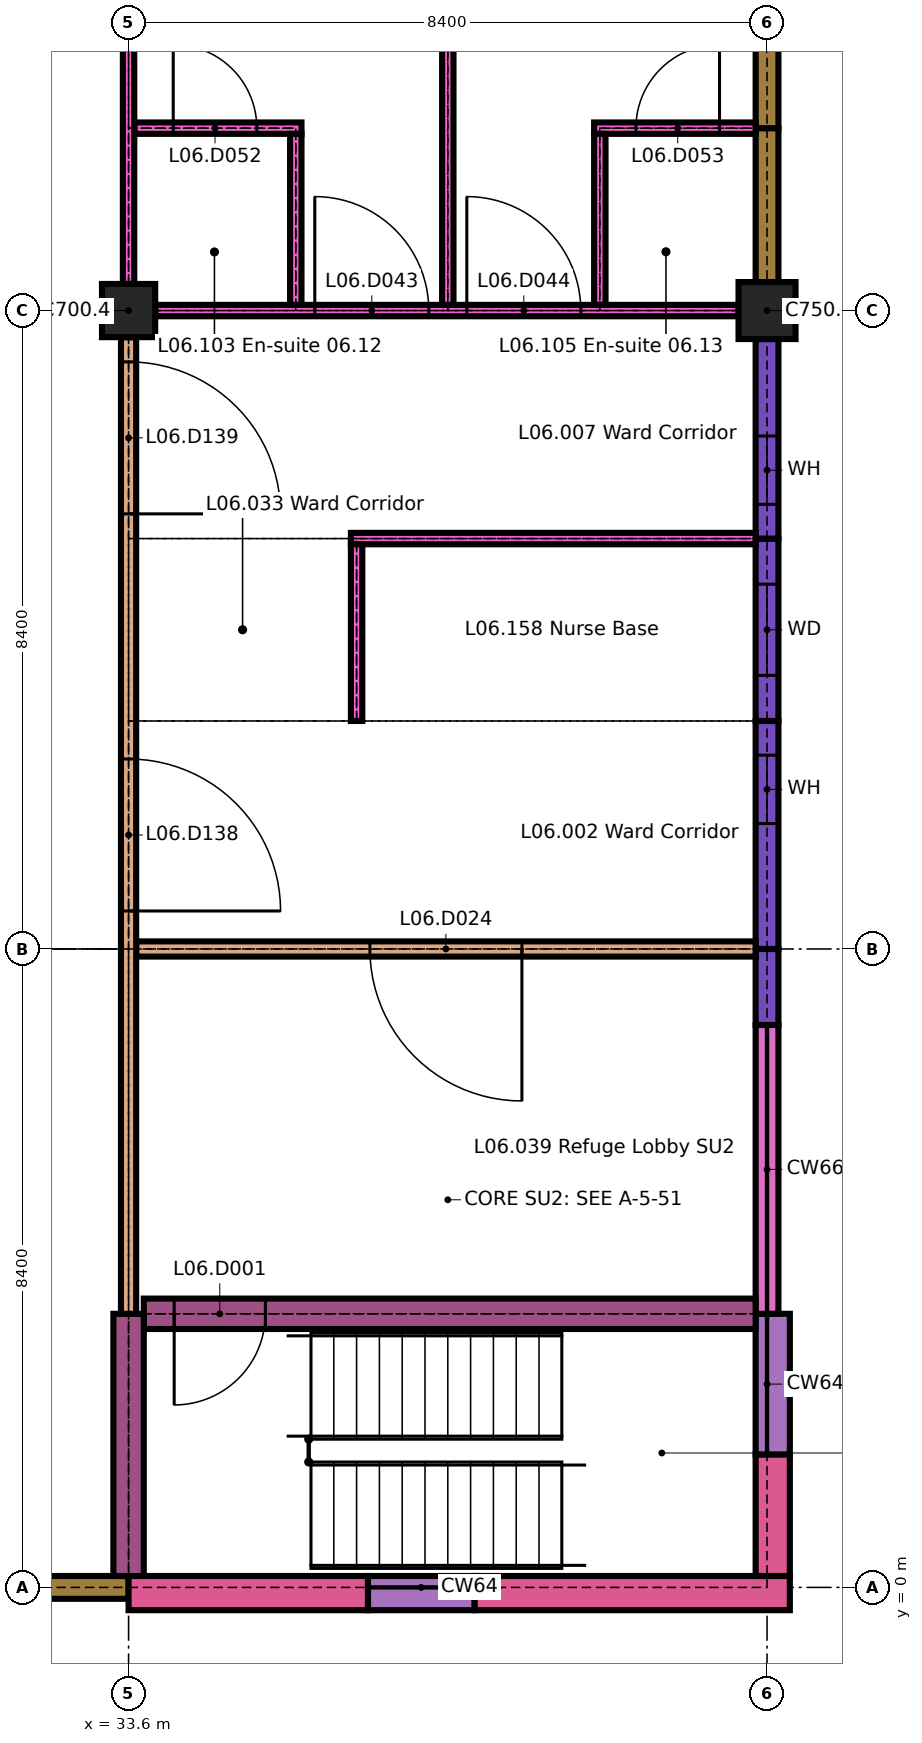
"""IFC4 building model, lengths in metres.
Left out: names, types, materials, properties, quantities, classifications, styles, units other than length and angle.
Written with IfcOpenShell. Run it as: python <this file> out.ifc"""

import sys

from ifc_helpers import new_model, si_unit, direction, frame, frame_2d, origin, origin_2d, place, context, subcontext, project, spatial, rectangle, extrude, element, fill, save


model = new_model("IFC4")
c1 = context("Model", 3, precision=1e-05, world=origin(), true_north=direction((0.0, 1.0)))
c2 = subcontext(c1, "Body", "Model", "MODEL_VIEW")
j1 = project(units=[si_unit("LENGTHUNIT", "METRE"), si_unit("PLANEANGLEUNIT", "RADIAN")], contexts=[c1])
p1 = place(None, origin())
s1 = spatial("IfcSite", under=j1, at=p1, CompositionType="ELEMENT")
p2 = place(p1, origin())
s2 = spatial("IfcBuilding", under=s1, at=p2, CompositionType="ELEMENT")
p3 = place(p2, frame((0.0, 0.0, 26.1)))
s3 = spatial("IfcBuildingStorey", under=s2, at=p3, CompositionType="ELEMENT", Elevation=26.1)
p4 = place(p3, frame((33.6, 16.8, 0.0), z_axis=(0.0, 0.0, 1.0), x_axis=(1.0, 0.0, 0.0)))
e1 = element("IfcColumn", 1, at=p4, inside=s3, PredefinedType="COLUMN", context=c2, shape_type="SweptSolid", body=[
    extrude(rectangle(XDim=0.7, YDim=0.7, at=origin_2d()), origin(), (0.0, 0.0, 1.0), 3.3),
])
p5 = place(p3, frame((42.0, 16.8, 0.0), z_axis=(0.0, 0.0, 1.0), x_axis=(1.0, 0.0, 0.0)))
e2 = element("IfcColumn", 2, at=p5, inside=s3, PredefinedType="COLUMN", context=c2, shape_type="SweptSolid", body=[
    extrude(rectangle(XDim=0.75, YDim=0.75, at=origin_2d()), origin(), (0.0, 0.0, 1.0), 3.2),
])
p6 = place(p3, frame((32.3, 0.0, 0.0), z_axis=(0.0, 0.0, 1.0), x_axis=(1.0, 0.0, 0.0)))
e3 = element("IfcWall", 3, at=p6, inside=s3, PredefinedType="SOLIDWALL", context=c2, shape_type="SweptSolid", body=[
    extrude(rectangle(XDim=1.3, YDim=0.3, at=frame_2d((0.65, 0.0))), origin(), (0.0, 0.0, 1.0), 2.9),
])
p7 = place(p3, frame((33.6, -0.075, 0.0), z_axis=(0.0, 0.0, 1.0), x_axis=(1.0, 0.0, 0.0)))
e4 = element("IfcWall", 4, at=p7, inside=s3, PredefinedType="SOLIDWALL", context=c2, shape_type="SweptSolid", body=[
    extrude(rectangle(XDim=3.15, YDim=0.45, at=frame_2d((1.575, 0.0))), origin(), (0.0, 0.0, 1.0), 3.3),
])
p8 = place(p3, frame((38.15, -0.075, 0.0), z_axis=(0.0, 0.0, 1.0), x_axis=(1.0, 0.0, 0.0)))
e5 = element("IfcWall", 5, at=p8, inside=s3, PredefinedType="SOLIDWALL", context=c2, shape_type="SweptSolid", body=[
    extrude(rectangle(XDim=4.15, YDim=0.45, at=frame_2d((2.075, 0.0))), origin(), (0.0, 0.0, 1.0), 3.3),
])
p9 = place(p3, frame((36.75, -0.075, 0.0), z_axis=(0.0, 0.0, 1.0), x_axis=(1.0, 0.0, 0.0)))
e6 = element("IfcWall", 6, at=p9, inside=s3, PredefinedType="SOLIDWALL", context=c2, shape_type="SweptSolid", body=[
    extrude(rectangle(XDim=1.4, YDim=0.45, at=frame_2d((0.7, 0.0))), origin(), (0.0, 0.0, 1.0), 0.6),
])
p10 = place(p3, frame((42.075, 0.15, 0.0), z_axis=(0.0, 0.0, 1.0), x_axis=(0.0, 1.0, 0.0)))
e7 = element("IfcWall", 7, at=p10, inside=s3, PredefinedType="SOLIDWALL", context=c2, shape_type="SweptSolid", body=[
    extrude(rectangle(XDim=1.6, YDim=0.45, at=frame_2d((0.8, 0.0))), origin(), (0.0, 0.0, 1.0), 3.3),
])
p11 = place(p3, frame((42.075, 1.75, 0.0), z_axis=(0.0, 0.0, 1.0), x_axis=(0.0, 1.0, 0.0)))
e8 = element("IfcWall", 8, at=p11, inside=s3, PredefinedType="SOLIDWALL", context=c2, shape_type="SweptSolid", body=[
    extrude(rectangle(XDim=1.85, YDim=0.45, at=frame_2d((0.925, 0.0))), origin(), (0.0, 0.0, 1.0), 0.6),
])
p12 = place(p3, frame((42.0, 7.4, 0.0), z_axis=(0.0, 0.0, 1.0), x_axis=(0.0, 1.0, 0.0)))
e9 = element("IfcWall", 9, at=p12, inside=s3, PredefinedType="SOLIDWALL", context=c2, shape_type="SweptSolid", body=[
    extrude(rectangle(XDim=1.0, YDim=0.3, at=frame_2d((0.5, 0.0))), origin(), (0.0, 0.0, 1.0), 3.3),
])
p13 = place(p3, frame((42.0, 3.6, 0.0), z_axis=(0.0, 0.0, 1.0), x_axis=(0.0, 1.0, 0.0)))
e10 = element("IfcWall", 10, at=p13, inside=s3, PredefinedType="SOLIDWALL", context=c2, shape_type="SweptSolid", body=[
    extrude(rectangle(XDim=3.8, YDim=0.3, at=frame_2d((1.9, 0.0))), origin(), (0.0, 0.0, 1.0), 0.6),
])
p14 = place(p3, frame((42.0, 8.4, 0.0), z_axis=(0.0, 0.0, 1.0), x_axis=(0.0, 1.0, 0.0)))
e11 = element("IfcWall", 11, at=p14, inside=s3, PredefinedType="SOLIDWALL", context=c2, shape_type="SweptSolid", body=[
    extrude(rectangle(XDim=3.0, YDim=0.3, at=frame_2d((1.5, 0.0))), origin(), (0.0, 0.0, 1.0), 3.3),
])
p15 = place(p14, frame((1.65, 0.0, 0.9)))
e12 = element("IfcOpeningElement", 12, at=p15, cuts=e11, PredefinedType="OPENING", context=c2, shape_type="SweptSolid", body=[
    extrude(rectangle(XDim=0.9, YDim=1.5, at=frame_2d((0.45, 0.75))), frame((0.0, 0.16, 0.0), z_axis=(0.0, -1.0, 0.0), x_axis=(1.0, 0.0, 0.0)), (0.0, 0.0, 1.0), 0.32),
])
p16 = place(p3, frame((42.0, 11.4, 0.0), z_axis=(0.0, 0.0, 1.0), x_axis=(0.0, 1.0, 0.0)))
e13 = element("IfcWall", 13, at=p16, inside=s3, PredefinedType="SOLIDWALL", context=c2, shape_type="SweptSolid", body=[
    extrude(rectangle(XDim=2.4, YDim=0.3, at=frame_2d((1.2, 0.0))), origin(), (0.0, 0.0, 1.0), 3.3),
])
p17 = place(p16, frame((0.6, 0.0, 0.9)))
e14 = element("IfcOpeningElement", 14, at=p17, cuts=e13, PredefinedType="OPENING", context=c2, shape_type="SweptSolid", body=[
    extrude(rectangle(XDim=1.2, YDim=1.5, at=frame_2d((0.6, 0.75))), frame((0.0, 0.16, 0.0), z_axis=(0.0, -1.0, 0.0), x_axis=(1.0, 0.0, 0.0)), (0.0, 0.0, 1.0), 0.32),
])
p18 = place(p3, frame((42.0, 13.8, 0.0), z_axis=(0.0, 0.0, 1.0), x_axis=(0.0, 1.0, 0.0)))
e15 = element("IfcWall", 15, at=p18, inside=s3, PredefinedType="SOLIDWALL", context=c2, shape_type="SweptSolid", body=[
    extrude(rectangle(XDim=2.625, YDim=0.3, at=frame_2d((1.312, 0.0))), origin(), (0.0, 0.0, 1.0), 3.3),
])
p19 = place(p18, frame((0.45, 0.0, 0.9)))
e16 = element("IfcOpeningElement", 16, at=p19, cuts=e15, PredefinedType="OPENING", context=c2, shape_type="SweptSolid", body=[
    extrude(rectangle(XDim=0.9, YDim=1.5, at=frame_2d((0.45, 0.75))), frame((0.0, 0.16, 0.0), z_axis=(0.0, -1.0, 0.0), x_axis=(1.0, 0.0, 0.0)), (0.0, 0.0, 1.0), 0.32),
])
p20 = place(p3, frame((42.0, 17.175, 0.0), z_axis=(0.0, 0.0, 1.0), x_axis=(0.0, 1.0, 0.0)))
e17 = element("IfcWall", 17, at=p20, inside=s3, PredefinedType="SOLIDWALL", context=c2, shape_type="SweptSolid", body=[
    extrude(rectangle(XDim=2.025, YDim=0.3, at=frame_2d((1.012, 0.0))), origin(), (0.0, 0.0, 1.0), 2.9),
])
p21 = place(p3, frame((42.0, 19.2, 0.0), z_axis=(0.0, 0.0, 1.0), x_axis=(0.0, 1.0, 0.0)))
e18 = element("IfcWall", 18, at=p21, inside=s3, PredefinedType="SOLIDWALL", context=c2, shape_type="SweptSolid", body=[
    extrude(rectangle(XDim=5.625, YDim=0.3, at=frame_2d((2.812, 0.0))), origin(), (0.0, 0.0, 1.0), 2.9),
])
p22 = place(p21, frame((2.85, 0.0, 0.9)))
e19 = element("IfcOpeningElement", 19, at=p22, cuts=e18, PredefinedType="OPENING", context=c2, shape_type="SweptSolid", body=[
    extrude(rectangle(XDim=2.1, YDim=1.5, at=frame_2d((1.05, 0.75))), frame((0.0, 0.16, 0.0), z_axis=(0.0, -1.0, 0.0), x_axis=(1.0, 0.0, 0.0)), (0.0, 0.0, 1.0), 0.32),
])
p23 = place(p3, frame((33.8, 3.6, 0.0), z_axis=(0.0, 0.0, 1.0), x_axis=(1.0, 0.0, 0.0)))
e20 = element("IfcWall", 20, at=p23, inside=s3, PredefinedType="SHEAR", context=c2, shape_type="SweptSolid", body=[
    extrude(rectangle(XDim=8.05, YDim=0.4, at=frame_2d((4.025, 0.0))), origin(), (0.0, 0.0, 1.0), 3.3),
])
p24 = place(p23, frame((0.4, 0.0, 0.0)))
e21 = element("IfcOpeningElement", 21, at=p24, cuts=e20, PredefinedType="OPENING", context=c2, shape_type="SweptSolid", body=[
    extrude(rectangle(XDim=1.2, YDim=2.1, at=frame_2d((0.6, 1.05))), frame((0.0, 0.21, 0.0), z_axis=(0.0, -1.0, 0.0), x_axis=(1.0, 0.0, 0.0)), (0.0, 0.0, 1.0), 0.42),
])
p25 = place(p3, frame((33.7, 8.4, 0.0), z_axis=(0.0, 0.0, 1.0), x_axis=(1.0, 0.0, 0.0)))
e22 = element("IfcWall", 22, at=p25, inside=s3, PredefinedType="PARTITIONING", context=c2, shape_type="SweptSolid", body=[
    extrude(rectangle(XDim=8.15, YDim=0.2, at=frame_2d((4.075, 0.0))), origin(), (0.0, 0.0, 1.0), 3.3),
])
p26 = place(p25, frame((3.075, 0.0, 0.0)))
e23 = element("IfcOpeningElement", 23, at=p26, cuts=e22, PredefinedType="OPENING", context=c2, shape_type="SweptSolid", body=[
    extrude(rectangle(XDim=2.0, YDim=2.4, at=frame_2d((1.0, 1.2))), frame((0.0, 0.11, 0.0), z_axis=(0.0, -1.0, 0.0), x_axis=(1.0, 0.0, 0.0)), (0.0, 0.0, 1.0), 0.22),
])
p27 = place(p3, frame((36.525, 13.8, 0.0), z_axis=(0.0, 0.0, 1.0), x_axis=(1.0, 0.0, 0.0)))
e24 = element("IfcWall", 24, at=p27, inside=s3, PredefinedType="PARTITIONING", context=c2, shape_type="SweptSolid", body=[
    extrude(rectangle(XDim=5.325, YDim=0.15, at=frame_2d((2.663, 0.0))), origin(), (0.0, 0.0, 1.0), 3.3),
])
p28 = place(p3, frame((33.95, 16.8, 0.0), z_axis=(0.0, 0.0, 1.0), x_axis=(1.0, 0.0, 0.0)))
e25 = element("IfcWall", 25, at=p28, inside=s3, PredefinedType="PARTITIONING", context=c2, shape_type="SweptSolid", body=[
    extrude(rectangle(XDim=7.675, YDim=0.15, at=frame_2d((3.837, 0.0))), origin(), (0.0, 0.0, 1.0), 3.3),
])
p29 = place(p28, frame((2.1, 0.0, 0.0)))
e26 = element("IfcOpeningElement", 26, at=p29, cuts=e25, PredefinedType="OPENING", context=c2, shape_type="SweptSolid", body=[
    extrude(rectangle(XDim=1.5, YDim=2.4, at=frame_2d((0.75, 1.2))), frame((0.0, 0.085, 0.0), z_axis=(0.0, -1.0, 0.0), x_axis=(1.0, 0.0, 0.0)), (0.0, 0.0, 1.0), 0.17),
])
p30 = place(p28, frame((4.1, 0.0, 0.0)))
e27 = element("IfcOpeningElement", 27, at=p30, cuts=e25, PredefinedType="OPENING", context=c2, shape_type="SweptSolid", body=[
    extrude(rectangle(XDim=1.5, YDim=2.4, at=frame_2d((0.75, 1.2))), frame((0.0, 0.085, 0.0), z_axis=(0.0, -1.0, 0.0), x_axis=(1.0, 0.0, 0.0)), (0.0, 0.0, 1.0), 0.17),
])
p31 = place(p3, frame((33.675, 19.2, 0.0), z_axis=(0.0, 0.0, 1.0), x_axis=(1.0, 0.0, 0.0)))
e28 = element("IfcWall", 28, at=p31, inside=s3, PredefinedType="PARTITIONING", context=c2, shape_type="SweptSolid", body=[
    extrude(rectangle(XDim=2.2, YDim=0.15, at=frame_2d((1.1, 0.0))), origin(), (0.0, 0.0, 1.0), 3.3),
])
p32 = place(p31, frame((0.512, 0.0, 0.0)))
e29 = element("IfcOpeningElement", 29, at=p32, cuts=e28, PredefinedType="OPENING", context=c2, shape_type="SweptSolid", body=[
    extrude(rectangle(XDim=1.1, YDim=2.1, at=frame_2d((0.55, 1.05))), frame((0.0, 0.085, 0.0), z_axis=(0.0, -1.0, 0.0), x_axis=(1.0, 0.0, 0.0)), (0.0, 0.0, 1.0), 0.17),
])
p33 = place(p3, frame((39.725, 19.2, 0.0), z_axis=(0.0, 0.0, 1.0), x_axis=(1.0, 0.0, 0.0)))
e30 = element("IfcWall", 30, at=p33, inside=s3, PredefinedType="PARTITIONING", context=c2, shape_type="SweptSolid", body=[
    extrude(rectangle(XDim=2.125, YDim=0.15, at=frame_2d((1.062, 0.0))), origin(), (0.0, 0.0, 1.0), 3.3),
])
p34 = place(p33, frame((0.55, 0.0, 0.0)))
e31 = element("IfcOpeningElement", 31, at=p34, cuts=e30, PredefinedType="OPENING", context=c2, shape_type="SweptSolid", body=[
    extrude(rectangle(XDim=1.1, YDim=2.1, at=frame_2d((0.55, 1.05))), frame((0.0, 0.085, 0.0), z_axis=(0.0, -1.0, 0.0), x_axis=(1.0, 0.0, 0.0)), (0.0, 0.0, 1.0), 0.17),
])
p35 = place(p3, frame((33.6, 0.15, 0.0), z_axis=(0.0, 0.0, 1.0), x_axis=(0.0, 1.0, 0.0)))
e32 = element("IfcWall", 32, at=p35, inside=s3, PredefinedType="SHEAR", context=c2, shape_type="SweptSolid", body=[
    extrude(rectangle(XDim=3.45, YDim=0.4, at=frame_2d((1.725, 0.0))), origin(), (0.0, 0.0, 1.0), 3.3),
])
p36 = place(p3, frame((33.6, 3.6, 0.0), z_axis=(0.0, 0.0, 1.0), x_axis=(0.0, 1.0, 0.0)))
e33 = element("IfcWall", 33, at=p36, inside=s3, PredefinedType="PARTITIONING", context=c2, shape_type="SweptSolid", body=[
    extrude(rectangle(XDim=12.85, YDim=0.2, at=frame_2d((6.425, 0.0))), origin(), (0.0, 0.0, 1.0), 3.3),
])
p37 = place(p36, frame((5.3, 0.0, 0.0)))
e34 = element("IfcOpeningElement", 34, at=p37, cuts=e33, PredefinedType="OPENING", context=c2, shape_type="SweptSolid", body=[
    extrude(rectangle(XDim=2.0, YDim=2.4, at=frame_2d((1.0, 1.2))), frame((0.0, 0.11, 0.0), z_axis=(0.0, -1.0, 0.0), x_axis=(1.0, 0.0, 0.0)), (0.0, 0.0, 1.0), 0.22),
])
p38 = place(p36, frame((10.525, 0.0, 0.0)))
e35 = element("IfcOpeningElement", 35, at=p38, cuts=e33, PredefinedType="OPENING", context=c2, shape_type="SweptSolid", body=[
    extrude(rectangle(XDim=2.0, YDim=2.4, at=frame_2d((1.0, 1.2))), frame((0.0, 0.11, 0.0), z_axis=(0.0, -1.0, 0.0), x_axis=(1.0, 0.0, 0.0)), (0.0, 0.0, 1.0), 0.22),
])
p39 = place(p3, frame((33.6, 17.15, 0.0), z_axis=(0.0, 0.0, 1.0), x_axis=(0.0, 1.0, 0.0)))
e36 = element("IfcWall", 36, at=p39, inside=s3, PredefinedType="PARTITIONING", context=c2, shape_type="SweptSolid", body=[
    extrude(rectangle(XDim=7.7, YDim=0.15, at=frame_2d((3.85, 0.0))), origin(), (0.0, 0.0, 1.0), 3.3),
])
p40 = place(p3, frame((35.8, 16.875, 0.0), z_axis=(0.0, 0.0, 1.0), x_axis=(0.0, 1.0, 0.0)))
e37 = element("IfcWall", 37, at=p40, inside=s3, PredefinedType="PARTITIONING", context=c2, shape_type="SweptSolid", body=[
    extrude(rectangle(XDim=2.25, YDim=0.15, at=frame_2d((1.125, 0.0))), origin(), (0.0, 0.0, 1.0), 3.3),
])
p41 = place(p3, frame((36.6, 11.4, 0.0), z_axis=(0.0, 0.0, 1.0), x_axis=(0.0, 1.0, 0.0)))
e38 = element("IfcWall", 38, at=p41, inside=s3, PredefinedType="PARTITIONING", context=c2, shape_type="SweptSolid", body=[
    extrude(rectangle(XDim=2.325, YDim=0.15, at=frame_2d((1.163, 0.0))), origin(), (0.0, 0.0, 1.0), 3.3),
])
p42 = place(p3, frame((37.8, 16.875, 0.0), z_axis=(0.0, 0.0, 1.0), x_axis=(0.0, 1.0, 0.0)))
e39 = element("IfcWall", 39, at=p42, inside=s3, PredefinedType="PARTITIONING", context=c2, shape_type="SweptSolid", body=[
    extrude(rectangle(XDim=8.175, YDim=0.15, at=frame_2d((4.087, 0.0))), origin(), (0.0, 0.0, 1.0), 3.3),
])
p43 = place(p3, frame((39.8, 16.875, 0.0), z_axis=(0.0, 0.0, 1.0), x_axis=(0.0, 1.0, 0.0)))
e40 = element("IfcWall", 40, at=p43, inside=s3, PredefinedType="PARTITIONING", context=c2, shape_type="SweptSolid", body=[
    extrude(rectangle(XDim=2.25, YDim=0.15, at=frame_2d((1.125, 0.0))), origin(), (0.0, 0.0, 1.0), 3.3),
])
p44 = place(p15, origin())
e41 = element("IfcWindow", 41, at=p44, inside=s3, PartitioningType="SINGLE_PANEL", PredefinedType="WINDOW", context=c2, shape_type="SweptSolid", body=[
    extrude(rectangle(XDim=0.9, YDim=1.5, at=frame_2d((0.45, 0.75))), frame((0.0, 0.03, 0.0), z_axis=(0.0, -1.0, 0.0), x_axis=(1.0, 0.0, 0.0)), (0.0, 0.0, 1.0), 0.06),
])
fill(e12, e41)
p45 = place(p17, origin())
e42 = element("IfcWindow", 42, at=p45, inside=s3, PartitioningType="SINGLE_PANEL", PredefinedType="WINDOW", context=c2, shape_type="SweptSolid", body=[
    extrude(rectangle(XDim=1.2, YDim=1.5, at=frame_2d((0.6, 0.75))), frame((0.0, 0.03, 0.0), z_axis=(0.0, -1.0, 0.0), x_axis=(1.0, 0.0, 0.0)), (0.0, 0.0, 1.0), 0.06),
])
fill(e14, e42)
p46 = place(p19, origin())
e43 = element("IfcWindow", 43, at=p46, inside=s3, PartitioningType="SINGLE_PANEL", PredefinedType="WINDOW", context=c2, shape_type="SweptSolid", body=[
    extrude(rectangle(XDim=0.9, YDim=1.5, at=frame_2d((0.45, 0.75))), frame((0.0, 0.03, 0.0), z_axis=(0.0, -1.0, 0.0), x_axis=(1.0, 0.0, 0.0)), (0.0, 0.0, 1.0), 0.06),
])
fill(e16, e43)
p47 = place(p24, origin())
e44 = element("IfcDoor", 44, at=p47, inside=s3, OperationType="SINGLE_SWING_LEFT", PredefinedType="DOOR", context=c2, shape_type="SweptSolid", body=[
    extrude(rectangle(XDim=1.2, YDim=2.1, at=frame_2d((0.6, 1.05))), frame((0.0, 0.025, 0.0), z_axis=(0.0, -1.0, 0.0), x_axis=(1.0, 0.0, 0.0)), (0.0, 0.0, 1.0), 0.05),
])
fill(e21, e44)
p48 = place(p26, origin())
e45 = element("IfcDoor", 45, at=p48, inside=s3, OperationType="SINGLE_SWING_RIGHT", PredefinedType="DOOR", context=c2, shape_type="SweptSolid", body=[
    extrude(rectangle(XDim=2.0, YDim=2.4, at=frame_2d((1.0, 1.2))), frame((0.0, 0.03, 0.0), z_axis=(0.0, -1.0, 0.0), x_axis=(1.0, 0.0, 0.0)), (0.0, 0.0, 1.0), 0.06),
])
fill(e23, e45)
p49 = place(p29, origin())
e46 = element("IfcDoor", 46, at=p49, inside=s3, OperationType="SINGLE_SWING_RIGHT", PredefinedType="DOOR", context=c2, shape_type="SweptSolid", body=[
    extrude(rectangle(XDim=1.5, YDim=2.4, at=frame_2d((0.75, 1.2))), frame((0.0, 0.03, 0.0), z_axis=(0.0, -1.0, 0.0), x_axis=(1.0, 0.0, 0.0)), (0.0, 0.0, 1.0), 0.06),
])
fill(e26, e46)
p50 = place(p30, origin())
e47 = element("IfcDoor", 47, at=p50, inside=s3, OperationType="SINGLE_SWING_RIGHT", PredefinedType="DOOR", context=c2, shape_type="SweptSolid", body=[
    extrude(rectangle(XDim=1.5, YDim=2.4, at=frame_2d((0.75, 1.2))), frame((0.0, 0.03, 0.0), z_axis=(0.0, -1.0, 0.0), x_axis=(1.0, 0.0, 0.0)), (0.0, 0.0, 1.0), 0.06),
])
fill(e27, e47)
p51 = place(p32, origin())
e48 = element("IfcDoor", 48, at=p51, inside=s3, OperationType="SINGLE_SWING_RIGHT", PredefinedType="DOOR", context=c2, shape_type="SweptSolid", body=[
    extrude(rectangle(XDim=1.1, YDim=2.1, at=frame_2d((0.55, 1.05))), frame((0.0, 0.025, 0.0), z_axis=(0.0, -1.0, 0.0), x_axis=(1.0, 0.0, 0.0)), (0.0, 0.0, 1.0), 0.05),
])
fill(e29, e48)
p52 = place(p34, origin())
e49 = element("IfcDoor", 49, at=p52, inside=s3, OperationType="SINGLE_SWING_LEFT", PredefinedType="DOOR", context=c2, shape_type="SweptSolid", body=[
    extrude(rectangle(XDim=1.1, YDim=2.1, at=frame_2d((0.55, 1.05))), frame((0.0, 0.025, 0.0), z_axis=(0.0, -1.0, 0.0), x_axis=(1.0, 0.0, 0.0)), (0.0, 0.0, 1.0), 0.05),
])
fill(e31, e49)
p53 = place(p37, origin())
e50 = element("IfcDoor", 50, at=p53, inside=s3, OperationType="SINGLE_SWING_LEFT", PredefinedType="DOOR", context=c2, shape_type="SweptSolid", body=[
    extrude(rectangle(XDim=2.0, YDim=2.4, at=frame_2d((1.0, 1.2))), frame((0.0, 0.03, 0.0), z_axis=(0.0, -1.0, 0.0), x_axis=(1.0, 0.0, 0.0)), (0.0, 0.0, 1.0), 0.06),
])
fill(e34, e50)
p54 = place(p38, origin())
e51 = element("IfcDoor", 51, at=p54, inside=s3, OperationType="SINGLE_SWING_LEFT", PredefinedType="DOOR", context=c2, shape_type="SweptSolid", body=[
    extrude(rectangle(XDim=2.0, YDim=2.4, at=frame_2d((1.0, 1.2))), frame((0.0, 0.03, 0.0), z_axis=(0.0, -1.0, 0.0), x_axis=(1.0, 0.0, 0.0)), (0.0, 0.0, 1.0), 0.06),
])
fill(e35, e51)
save(model, sys.argv[1])
